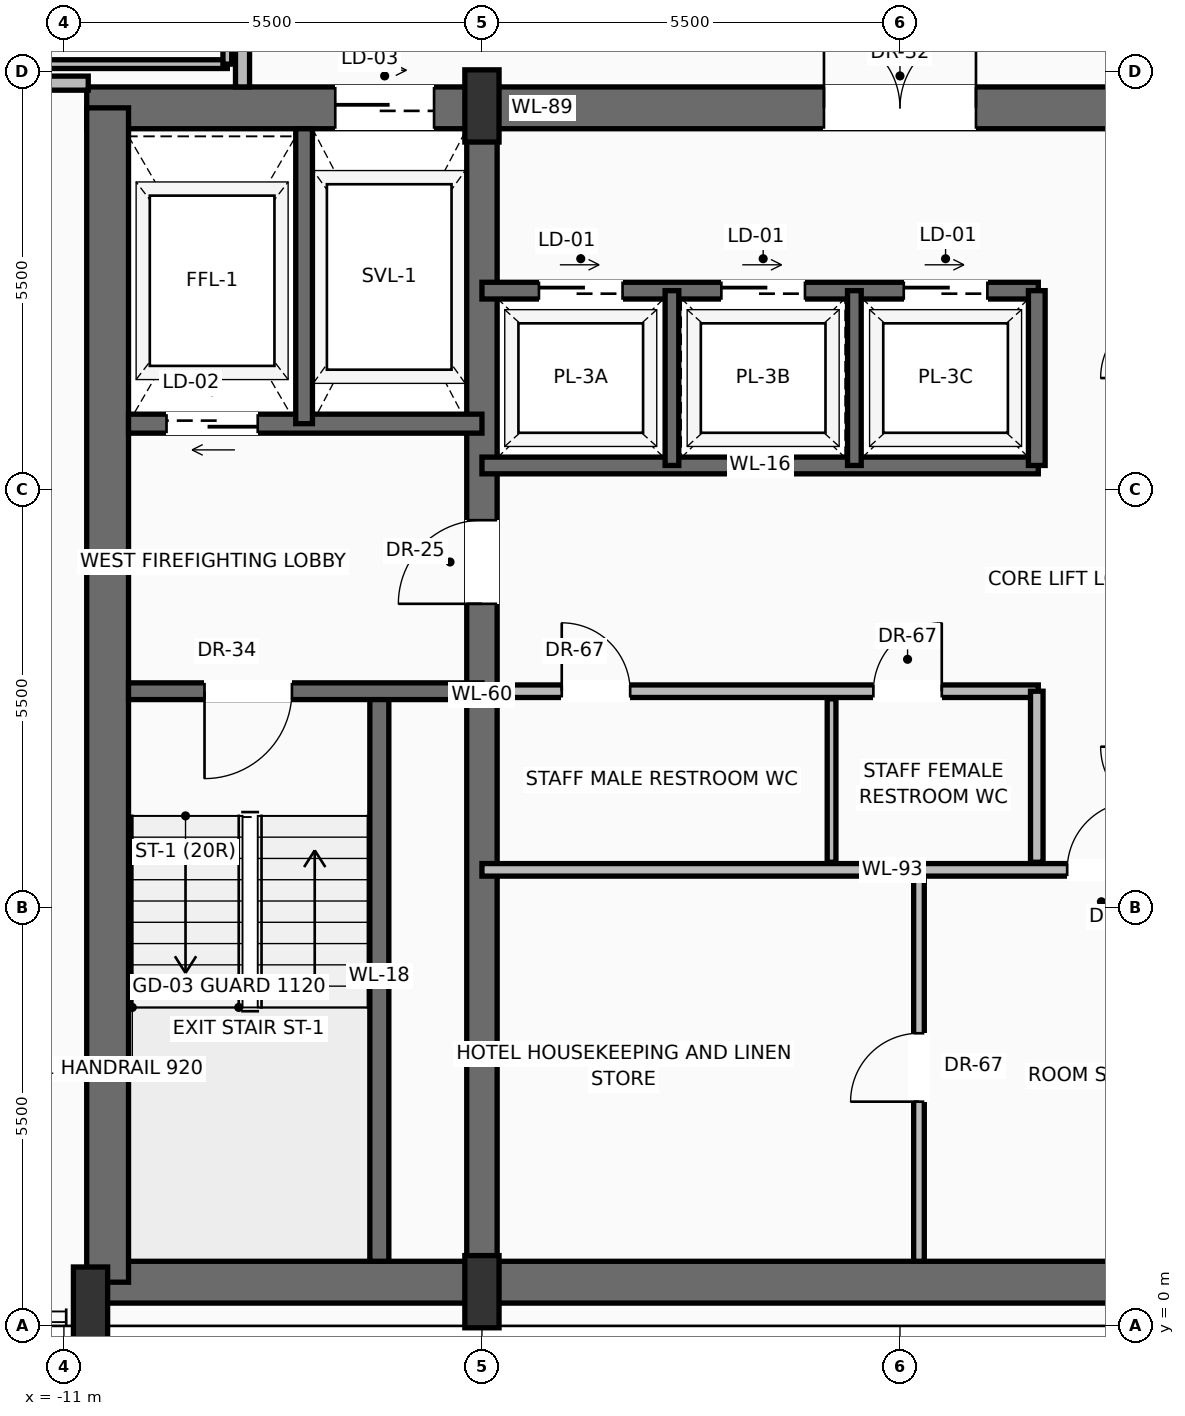
"""IFC4 building model, lengths in metres.
Left out: names, types, materials, properties, quantities, classifications, styles, units other than length and angle.
Written with IfcOpenShell. Run it as: python <this file> out.ifc"""

import sys

from ifc_helpers import new_model, si_unit, direction, frame, frame_2d, origin, origin_2d, place, context, subcontext, project, spatial, rectangle, extrude, source, transform, mapped, element, fill, save


model = new_model("IFC4")
c1 = context("Model", 3, precision=1e-05, world=origin(), true_north=direction((0.0, 1.0)))
c2 = subcontext(c1, "Body", "Model", "MODEL_VIEW")
j1 = project(units=[si_unit("LENGTHUNIT", "METRE"), si_unit("PLANEANGLEUNIT", "RADIAN")], contexts=[c1])
p1 = place(None, origin())
s1 = spatial("IfcSite", under=j1, at=p1, CompositionType="ELEMENT")
p2 = place(p1, origin())
s2 = spatial("IfcBuilding", under=s1, at=p2, CompositionType="ELEMENT")
p3 = place(p2, frame((0.0, 0.0, 230.35)))
s3 = spatial("IfcBuildingStorey", under=s2, at=p3, CompositionType="ELEMENT", Elevation=230.35)
p4 = place(p3, frame((-10.65, 0.575, 0.0), z_axis=(0.0, 0.0, 1.0), x_axis=(1.0, 0.0, 0.0)))
e1 = element("IfcWall", 1, at=p4, inside=s3, PredefinedType="SHEAR", context=c2, shape_type="SweptSolid", body=[
    extrude(rectangle(XDim=21.3, YDim=0.55, at=frame_2d((10.65, 0.0))), origin(), (0.0, 0.0, 1.0), 3.24),
])
p5 = place(p3, frame((-10.7, 16.025, 0.0), z_axis=(0.0, 0.0, 1.0), x_axis=(1.0, 0.0, 0.0)))
e2 = element("IfcWall", 2, at=p5, inside=s3, PredefinedType="SHEAR", context=c2, shape_type="SweptSolid", body=[
    extrude(rectangle(XDim=21.4, YDim=0.55, at=frame_2d((10.7, 0.0))), origin(), (0.0, 0.0, 1.0), 3.24),
])
p6 = place(p5, frame((3.27, 0.0, 0.0)))
e3 = element("IfcOpeningElement", 3, at=p6, cuts=e2, PredefinedType="OPENING", context=c2, shape_type="SweptSolid", body=[
    extrude(rectangle(XDim=1.3, YDim=2.3, at=frame_2d((0.65, 1.15))), frame((0.0, 0.285, 0.0), z_axis=(0.0, -1.0, 0.0), x_axis=(1.0, 0.0, 0.0)), (0.0, 0.0, 1.0), 0.57),
])
p7 = place(p5, frame((9.7, 0.0, 0.0)))
e4 = element("IfcOpeningElement", 4, at=p7, cuts=e2, PredefinedType="OPENING", context=c2, shape_type="SweptSolid", body=[
    extrude(rectangle(XDim=2.0, YDim=2.4, at=frame_2d((1.0, 1.2))), frame((0.0, 0.285, 0.0), z_axis=(0.0, -1.0, 0.0), x_axis=(1.0, 0.0, 0.0)), (0.0, 0.0, 1.0), 0.57),
])
p8 = place(p3, frame((-10.425, 0.575, 0.0), z_axis=(0.0, 0.0, 1.0), x_axis=(0.0, 1.0, 0.0)))
e5 = element("IfcWall", 5, at=p8, inside=s3, PredefinedType="SHEAR", context=c2, shape_type="SweptSolid", body=[
    extrude(rectangle(XDim=15.45, YDim=0.55, at=frame_2d((7.725, 0.0))), origin(), (0.0, 0.0, 1.0), 3.24),
])
p9 = place(p3, frame((-5.5, 0.575, 0.0), z_axis=(0.0, 0.0, 1.0), x_axis=(0.0, 1.0, 0.0)))
e6 = element("IfcWall", 6, at=p9, inside=s3, PredefinedType="SHEAR", context=c2, shape_type="SweptSolid", body=[
    extrude(rectangle(XDim=15.45, YDim=0.4, at=frame_2d((7.725, 0.0))), origin(), (0.0, 0.0, 1.0), 3.24),
])
p10 = place(p9, frame((8.925, 0.0, 0.0)))
e7 = element("IfcOpeningElement", 7, at=p10, cuts=e6, PredefinedType="OPENING", context=c2, shape_type="SweptSolid", body=[
    extrude(rectangle(XDim=1.1, YDim=2.2, at=frame_2d((0.55, 1.1))), frame((0.0, 0.21, 0.0), z_axis=(0.0, -1.0, 0.0), x_axis=(1.0, 0.0, 0.0)), (0.0, 0.0, 1.0), 0.42),
])
m1 = source(origin(), c2, "Body", "SweptSolid", [
    extrude(rectangle(XDim=0.45, YDim=0.95, at=origin_2d()), origin(), (0.0, 0.0, 1.0), 3.45),
])
for number, where, z_axis, x_axis in (
    (8, (-10.65, 0.3, 0.0), (0.0, 0.0, 1.0), (1.0, 0.0, 0.0)),
    (9, (-5.5, 0.45, 0.0), (0.0, 0.0, 1.0), (1.0, 0.0, 0.0)),
    (10, (-5.5, 16.05, 0.0), (0.0, 0.0, 1.0), (1.0, 0.0, 0.0)),
):
    element("IfcColumn", number, at=place(p3, frame(where, z_axis=z_axis, x_axis=x_axis)), inside=s3, PredefinedType="PILASTER", context=c2, shape_type="MappedRepresentation", body=[
        mapped(m1, transform((0.0, 0.0, 0.0), scale=1.0)),
    ])
p11 = place(p3, frame((-19.586, 15.3, 0.0), z_axis=(0.0, 0.0, 1.0), x_axis=(0.510822157644, 0.859686409838, 0.0)))
e11 = element("IfcWall", 11, at=p11, inside=s3, PredefinedType="SOLIDWALL", context=c2, shape_type="SweptSolid", body=[
    extrude(rectangle(XDim=19.464, YDim=0.28, at=frame_2d((9.732, 0.0))), origin(), (0.0, 0.0, 1.0), 2.82),
])
p12 = place(p11, frame((4.671, 0.0, 0.0)))
e12 = element("IfcOpeningElement", 12, at=p12, cuts=e11, PredefinedType="OPENING", context=c2, shape_type="SweptSolid", body=[
    extrude(rectangle(XDim=1.6, YDim=2.35, at=frame_2d((0.8, 1.175))), frame((0.0, 0.15, 0.0), z_axis=(0.0, -1.0, 0.0), x_axis=(1.0, 0.0, 0.0)), (0.0, 0.0, 1.0), 0.3),
])
p13 = place(p11, frame((13.236, 0.0, 0.9)))
e13 = element("IfcOpeningElement", 13, at=p13, cuts=e11, PredefinedType="OPENING", context=c2, shape_type="SweptSolid", body=[
    extrude(rectangle(XDim=1.55, YDim=1.75, at=frame_2d((0.775, 0.875))), frame((0.0, 0.15, 0.0), z_axis=(0.0, -1.0, 0.0), x_axis=(1.0, 0.0, 0.0)), (0.0, 0.0, 1.0), 0.3),
])
p14 = place(p3, frame((-6.85, 0.85, 0.0), z_axis=(0.0, 0.0, 1.0), x_axis=(0.0, 1.0, 0.0)))
e14 = element("IfcWall", 14, at=p14, inside=s3, PredefinedType="SOLIDWALL", context=c2, shape_type="SweptSolid", body=[
    extrude(rectangle(XDim=7.5, YDim=0.25, at=frame_2d((3.75, 0.0))), origin(), (0.0, 0.0, 1.0), 3.24),
])
p15 = place(p3, frame((-5.5, 8.35, 0.0), z_axis=(0.0, 0.0, 1.0), x_axis=(-1.0, 0.0, 0.0)))
e15 = element("IfcWall", 15, at=p15, inside=s3, PredefinedType="SOLIDWALL", context=c2, shape_type="SweptSolid", body=[
    extrude(rectangle(XDim=4.65, YDim=0.22, at=frame_2d((2.325, 0.0))), origin(), (0.0, 0.0, 1.0), 3.24),
])
p16 = place(p15, frame((2.5, 0.0, 0.0)))
e16 = element("IfcOpeningElement", 16, at=p16, cuts=e15, PredefinedType="OPENING", context=c2, shape_type="SweptSolid", body=[
    extrude(rectangle(XDim=1.15, YDim=2.2, at=frame_2d((0.575, 1.1))), frame((0.0, 0.12, 0.0), z_axis=(0.0, -1.0, 0.0), x_axis=(1.0, 0.0, 0.0)), (0.0, 0.0, 1.0), 0.24),
])
p17 = place(p3, frame((-5.5, 11.87, 0.0), z_axis=(0.0, 0.0, 1.0), x_axis=(-1.0, 0.0, 0.0)))
e17 = element("IfcWall", 17, at=p17, inside=s3, PredefinedType="SOLIDWALL", context=c2, shape_type="SweptSolid", body=[
    extrude(rectangle(XDim=4.65, YDim=0.25, at=frame_2d((2.325, 0.0))), origin(), (0.0, 0.0, 1.0), 3.24),
])
p18 = place(p17, frame((2.95, 0.0, 0.0)))
e18 = element("IfcOpeningElement", 18, at=p18, cuts=e17, PredefinedType="OPENING", context=c2, shape_type="SweptSolid", body=[
    extrude(rectangle(XDim=1.2, YDim=2.25, at=frame_2d((0.6, 1.125))), frame((0.0, 0.135, 0.0), z_axis=(0.0, -1.0, 0.0), x_axis=(1.0, 0.0, 0.0)), (0.0, 0.0, 1.0), 0.27),
])
p19 = place(p3, frame((-7.84, 11.87, 0.0), z_axis=(0.0, 0.0, 1.0), x_axis=(0.0, 1.0, 0.0)))
e19 = element("IfcWall", 19, at=p19, inside=s3, PredefinedType="SOLIDWALL", context=c2, shape_type="SweptSolid", body=[
    extrude(rectangle(XDim=3.88, YDim=0.22, at=frame_2d((1.94, 0.0))), origin(), (0.0, 0.0, 1.0), 3.24),
])
p20 = place(p3, frame((-5.5, 6.0, 0.0), z_axis=(0.0, 0.0, 1.0), x_axis=(1.0, 0.0, 0.0)))
e20 = element("IfcWall", 20, at=p20, inside=s3, PredefinedType="PARTITIONING", context=c2, shape_type="SweptSolid", body=[
    extrude(rectangle(XDim=10.8, YDim=0.165, at=frame_2d((5.4, 0.0))), origin(), (0.0, 0.0, 1.0), 3.232),
])
p21 = place(p20, frame((7.7, 0.0, 0.0)))
e21 = element("IfcOpeningElement", 21, at=p21, cuts=e20, PredefinedType="OPENING", context=c2, shape_type="SweptSolid", body=[
    extrude(rectangle(XDim=0.9, YDim=2.1, at=frame_2d((0.45, 1.05))), frame((0.0, 0.093, 0.0), z_axis=(0.0, -1.0, 0.0), x_axis=(1.0, 0.0, 0.0)), (0.0, 0.0, 1.0), 0.185),
])
p22 = place(p3, frame((0.25, 0.85, 0.0), z_axis=(0.0, 0.0, 1.0), x_axis=(0.0, 1.0, 0.0)))
e22 = element("IfcWall", 22, at=p22, inside=s3, PredefinedType="PARTITIONING", context=c2, shape_type="SweptSolid", body=[
    extrude(rectangle(XDim=5.03, YDim=0.14, at=frame_2d((2.515, 0.0))), origin(), (0.0, 0.0, 1.0), 3.232),
])
p23 = place(p22, frame((2.1, 0.0, 0.0)))
e23 = element("IfcOpeningElement", 23, at=p23, cuts=e22, PredefinedType="OPENING", context=c2, shape_type="SweptSolid", body=[
    extrude(rectangle(XDim=0.9, YDim=2.1, at=frame_2d((0.45, 1.05))), frame((0.0, 0.08, 0.0), z_axis=(0.0, -1.0, 0.0), x_axis=(1.0, 0.0, 0.0)), (0.0, 0.0, 1.0), 0.16),
])
p24 = place(p3, frame((-5.3, 8.35, 0.0), z_axis=(0.0, 0.0, 1.0), x_axis=(1.0, 0.0, 0.0)))
e24 = element("IfcWall", 24, at=p24, inside=s3, PredefinedType="PARTITIONING", context=c2, shape_type="SweptSolid", body=[
    extrude(rectangle(XDim=7.12, YDim=0.165, at=frame_2d((3.56, 0.0))), origin(), (0.0, 0.0, 1.0), 3.232),
])
p25 = place(p24, frame((0.85, 0.0, 0.0)))
e25 = element("IfcOpeningElement", 25, at=p25, cuts=e24, PredefinedType="OPENING", context=c2, shape_type="SweptSolid", body=[
    extrude(rectangle(XDim=0.9, YDim=2.1, at=frame_2d((0.45, 1.05))), frame((0.0, 0.093, 0.0), z_axis=(0.0, -1.0, 0.0), x_axis=(1.0, 0.0, 0.0)), (0.0, 0.0, 1.0), 0.185),
])
p26 = place(p24, frame((4.95, 0.0, 0.0)))
e26 = element("IfcOpeningElement", 26, at=p26, cuts=e24, PredefinedType="OPENING", context=c2, shape_type="SweptSolid", body=[
    extrude(rectangle(XDim=0.9, YDim=2.1, at=frame_2d((0.45, 1.05))), frame((0.0, 0.093, 0.0), z_axis=(0.0, -1.0, 0.0), x_axis=(1.0, 0.0, 0.0)), (0.0, 0.0, 1.0), 0.185),
])
p27 = place(p3, frame((1.8, 6.1, 0.0), z_axis=(0.0, 0.0, 1.0), x_axis=(0.0, 1.0, 0.0)))
e27 = element("IfcWall", 27, at=p27, inside=s3, PredefinedType="PARTITIONING", context=c2, shape_type="SweptSolid", body=[
    extrude(rectangle(XDim=2.25, YDim=0.165, at=frame_2d((1.125, 0.0))), origin(), (0.0, 0.0, 1.0), 3.232),
])
p28 = place(p3, frame((-0.9, 6.1, 0.0), z_axis=(0.0, 0.0, 1.0), x_axis=(0.0, 1.0, 0.0)))
e28 = element("IfcWall", 28, at=p28, inside=s3, PredefinedType="PARTITIONING", context=c2, shape_type="SweptSolid", body=[
    extrude(rectangle(XDim=2.15, YDim=0.115, at=frame_2d((1.075, 0.0))), origin(), (0.0, 0.0, 1.0), 3.232),
])
p29 = place(p3, frame((-5.5, 11.32, 0.0), z_axis=(0.0, 0.0, 1.0), x_axis=(1.0, 0.0, 0.0)))
e29 = element("IfcWall", 29, at=p29, inside=s3, PredefinedType="SOLIDWALL", context=c2, shape_type="SweptSolid", body=[
    extrude(rectangle(XDim=7.32, YDim=0.22, at=frame_2d((3.66, 0.0))), origin(), (0.0, 0.0, 1.0), 3.24),
])
p30 = place(p3, frame((-5.5, 13.62, 0.0), z_axis=(0.0, 0.0, 1.0), x_axis=(1.0, 0.0, 0.0)))
e30 = element("IfcWall", 30, at=p30, inside=s3, PredefinedType="SOLIDWALL", context=c2, shape_type="SweptSolid", body=[
    extrude(rectangle(XDim=7.32, YDim=0.22, at=frame_2d((3.66, 0.0))), origin(), (0.0, 0.0, 1.0), 3.24),
])
p31 = place(p30, frame((0.75, 0.0, 0.0)))
e31 = element("IfcOpeningElement", 31, at=p31, cuts=e30, PredefinedType="OPENING", context=c2, shape_type="SweptSolid", body=[
    extrude(rectangle(XDim=1.1, YDim=2.2, at=frame_2d((0.55, 1.1))), frame((0.0, 0.12, 0.0), z_axis=(0.0, -1.0, 0.0), x_axis=(1.0, 0.0, 0.0)), (0.0, 0.0, 1.0), 0.24),
])
p32 = place(p30, frame((3.15, 0.0, 0.0)))
e32 = element("IfcOpeningElement", 32, at=p32, cuts=e30, PredefinedType="OPENING", context=c2, shape_type="SweptSolid", body=[
    extrude(rectangle(XDim=1.1, YDim=2.2, at=frame_2d((0.55, 1.1))), frame((0.0, 0.12, 0.0), z_axis=(0.0, -1.0, 0.0), x_axis=(1.0, 0.0, 0.0)), (0.0, 0.0, 1.0), 0.24),
])
p33 = place(p30, frame((5.55, 0.0, 0.0)))
e33 = element("IfcOpeningElement", 33, at=p33, cuts=e30, PredefinedType="OPENING", context=c2, shape_type="SweptSolid", body=[
    extrude(rectangle(XDim=1.1, YDim=2.2, at=frame_2d((0.55, 1.1))), frame((0.0, 0.12, 0.0), z_axis=(0.0, -1.0, 0.0), x_axis=(1.0, 0.0, 0.0)), (0.0, 0.0, 1.0), 0.24),
])
p34 = place(p3, frame((1.8, 11.32, 0.0), z_axis=(0.0, 0.0, 1.0), x_axis=(0.0, 1.0, 0.0)))
e34 = element("IfcWall", 34, at=p34, inside=s3, PredefinedType="SOLIDWALL", context=c2, shape_type="SweptSolid", body=[
    extrude(rectangle(XDim=2.3, YDim=0.22, at=frame_2d((1.15, 0.0))), origin(), (0.0, 0.0, 1.0), 3.24),
])
for number, where, z_axis, x_axis in (
    (35, (-3.0, 11.32, 0.0), (0.0, 0.0, 1.0), (0.0, 1.0, 0.0)),
    (36, (-0.6, 11.32, 0.0), (0.0, 0.0, 1.0), (0.0, 1.0, 0.0)),
):
    element("IfcWall", number, at=place(p3, frame(where, z_axis=z_axis, x_axis=x_axis)), inside=s3, PredefinedType="SOLIDWALL", context=c2, shape_type="SweptSolid", body=[
        extrude(rectangle(XDim=2.3, YDim=0.18, at=frame_2d((1.15, 0.0))), origin(), (0.0, 0.0, 1.0), 3.24),
    ])
p35 = place(p3, frame((-8.65, 16.3, 0.0), z_axis=(0.0, 0.0, 1.0), x_axis=(0.0, 1.0, 0.0)))
e37 = element("IfcWall", 37, at=p35, inside=s3, PredefinedType="PARTITIONING", context=c2, shape_type="SweptSolid", body=[
    extrude(rectangle(XDim=10.5, YDim=0.185, at=frame_2d((5.25, 0.0))), origin(), (0.0, 0.0, 1.0), 3.232),
])
p36 = place(p35, frame((2.854, 0.0, 0.0)))
e38 = element("IfcOpeningElement", 38, at=p36, cuts=e37, PredefinedType="OPENING", context=c2, shape_type="SweptSolid", body=[
    extrude(rectangle(XDim=1.05, YDim=2.25, at=frame_2d((0.525, 1.125))), frame((0.0, 0.103, 0.0), z_axis=(0.0, -1.0, 0.0), x_axis=(1.0, 0.0, 0.0)), (0.0, 0.0, 1.0), 0.205),
])
p37 = place(p35, frame((5.752, 0.0, 0.0)))
e39 = element("IfcOpeningElement", 39, at=p37, cuts=e37, PredefinedType="OPENING", context=c2, shape_type="SweptSolid", body=[
    extrude(rectangle(XDim=1.05, YDim=2.25, at=frame_2d((0.525, 1.125))), frame((0.0, 0.103, 0.0), z_axis=(0.0, -1.0, 0.0), x_axis=(1.0, 0.0, 0.0)), (0.0, 0.0, 1.0), 0.205),
])
p38 = place(p35, frame((8.457, 0.0, 0.0)))
e40 = element("IfcOpeningElement", 40, at=p38, cuts=e37, PredefinedType="OPENING", context=c2, shape_type="SweptSolid", body=[
    extrude(rectangle(XDim=1.05, YDim=2.25, at=frame_2d((0.525, 1.125))), frame((0.0, 0.103, 0.0), z_axis=(0.0, -1.0, 0.0), x_axis=(1.0, 0.0, 0.0)), (0.0, 0.0, 1.0), 0.205),
])
p39 = place(p3, frame((-19.114, 16.35, 0.0), z_axis=(0.0, 0.0, 1.0), x_axis=(1.0, 0.0, 0.0)))
e41 = element("IfcWall", 41, at=p39, inside=s3, PredefinedType="PARTITIONING", context=c2, shape_type="SweptSolid", body=[
    extrude(rectangle(XDim=8.434, YDim=0.185, at=frame_2d((4.217, 0.0))), origin(), (0.0, 0.0, 1.0), 3.232),
])
p40 = place(p39, frame((4.855, 0.0, 0.0)))
e42 = element("IfcOpeningElement", 42, at=p40, cuts=e41, PredefinedType="OPENING", context=c2, shape_type="SweptSolid", body=[
    extrude(rectangle(XDim=1.05, YDim=2.25, at=frame_2d((0.525, 1.125))), frame((0.0, 0.103, 0.0), z_axis=(0.0, -1.0, 0.0), x_axis=(1.0, 0.0, 0.0)), (0.0, 0.0, 1.0), 0.205),
])
p41 = place(p3, frame((-11.5, 16.6, 0.0), z_axis=(0.0, 0.0, 1.0), x_axis=(1.0, 0.0, 0.0)))
e43 = element("IfcWall", 43, at=p41, inside=s3, PredefinedType="PARTITIONING", context=c2, shape_type="SweptSolid", body=[
    extrude(rectangle(XDim=2.65, YDim=0.115, at=frame_2d((1.325, 0.0))), origin(), (0.0, 0.0, 1.0), 3.232),
])
p42 = place(p3, frame((-8.85, 16.6, 0.0), z_axis=(0.0, 0.0, 1.0), x_axis=(0.0, 1.0, 0.0)))
e44 = element("IfcWall", 44, at=p42, inside=s3, PredefinedType="PARTITIONING", context=c2, shape_type="SweptSolid", body=[
    extrude(rectangle(XDim=2.4, YDim=0.115, at=frame_2d((1.2, 0.0))), origin(), (0.0, 0.0, 1.0), 3.232),
])
m2 = source(origin(), c2, "Body", "SweptSolid", [
    extrude(rectangle(XDim=1.15, YDim=2.2, at=frame_2d((0.575, 1.1))), frame((0.0, 0.025, 0.0), z_axis=(0.0, -1.0, 0.0), x_axis=(1.0, 0.0, 0.0)), (0.0, 0.0, 1.0), 0.05),
])
p43 = place(p16, origin())
e45 = element("IfcDoor", 45, at=p43, inside=s3, OperationType="SINGLE_SWING_RIGHT", PredefinedType="DOOR", context=c2, shape_type="MappedRepresentation", body=[
    mapped(m2, transform((0.0, 0.0, 0.0), scale=1.0)),
])
fill(e16, e45)
m3 = source(origin(), c2, "Body", "SweptSolid", [
    extrude(rectangle(XDim=1.1, YDim=2.2, at=frame_2d((0.55, 1.1))), frame((0.0, 0.025, 0.0), z_axis=(0.0, -1.0, 0.0), x_axis=(1.0, 0.0, 0.0)), (0.0, 0.0, 1.0), 0.05),
])
p44 = place(p10, origin())
e46 = element("IfcDoor", 46, at=p44, inside=s3, OperationType="SINGLE_SWING_LEFT", PredefinedType="DOOR", context=c2, shape_type="MappedRepresentation", body=[
    mapped(m3, transform((0.0, 0.0, 0.0), scale=1.0)),
])
fill(e7, e46)
m4 = source(origin(), c2, "Body", "SweptSolid", [
    extrude(rectangle(XDim=1.2, YDim=2.25, at=frame_2d((0.6, 1.125))), frame((0.0, 0.025, 0.0), z_axis=(0.0, -1.0, 0.0), x_axis=(1.0, 0.0, 0.0)), (0.0, 0.0, 1.0), 0.05),
])
p45 = place(p18, origin())
e47 = element("IfcDoor", 47, at=p45, inside=s3, OperationType="SLIDING_TO_LEFT", PredefinedType="DOOR", context=c2, shape_type="MappedRepresentation", body=[
    mapped(m4, transform((0.0, 0.0, 0.0), scale=1.0)),
])
fill(e18, e47)
m5 = source(origin(), c2, "Body", "SweptSolid", [
    extrude(rectangle(XDim=1.3, YDim=2.3, at=frame_2d((0.65, 1.15))), frame((0.0, 0.025, 0.0), z_axis=(0.0, -1.0, 0.0), x_axis=(1.0, 0.0, 0.0)), (0.0, 0.0, 1.0), 0.05),
])
p46 = place(p6, origin())
e48 = element("IfcDoor", 48, at=p46, inside=s3, OperationType="SLIDING_TO_RIGHT", PredefinedType="DOOR", context=c2, shape_type="MappedRepresentation", body=[
    mapped(m5, transform((0.0, 0.0, 0.0), scale=1.0)),
])
fill(e3, e48)
m6 = source(origin(), c2, "Body", "SweptSolid", [
    extrude(rectangle(XDim=2.0, YDim=2.4, at=frame_2d((1.0, 1.2))), frame((0.0, 0.025, 0.0), z_axis=(0.0, -1.0, 0.0), x_axis=(1.0, 0.0, 0.0)), (0.0, 0.0, 1.0), 0.05),
])
p47 = place(p7, origin())
e49 = element("IfcDoor", 49, at=p47, inside=s3, OperationType="DOUBLE_DOOR_SINGLE_SWING", PredefinedType="DOOR", context=c2, shape_type="MappedRepresentation", body=[
    mapped(m6, transform((0.0, 0.0, 0.0), scale=1.0)),
])
fill(e4, e49)
m7 = source(origin(), c2, "Body", "SweptSolid", [
    extrude(rectangle(XDim=0.9, YDim=2.1, at=frame_2d((0.45, 1.05))), frame((0.0, 0.025, 0.0), z_axis=(0.0, -1.0, 0.0), x_axis=(1.0, 0.0, 0.0)), (0.0, 0.0, 1.0), 0.05),
])
p48 = place(p21, origin())
e50 = element("IfcDoor", 50, at=p48, inside=s3, OperationType="SINGLE_SWING_RIGHT", PredefinedType="DOOR", context=c2, shape_type="MappedRepresentation", body=[
    mapped(m7, transform((0.0, 0.0, 0.0), scale=1.0)),
])
fill(e21, e50)
p49 = place(p23, origin())
e51 = element("IfcDoor", 51, at=p49, inside=s3, OperationType="SINGLE_SWING_LEFT", PredefinedType="DOOR", context=c2, shape_type="MappedRepresentation", body=[
    mapped(m7, transform((0.0, 0.0, 0.0), scale=1.0)),
])
fill(e23, e51)
p50 = place(p25, origin())
e52 = element("IfcDoor", 52, at=p50, inside=s3, OperationType="SINGLE_SWING_LEFT", PredefinedType="DOOR", context=c2, shape_type="MappedRepresentation", body=[
    mapped(m7, transform((0.0, 0.0, 0.0), scale=1.0)),
])
fill(e25, e52)
p51 = place(p26, origin())
e53 = element("IfcDoor", 53, at=p51, inside=s3, OperationType="SINGLE_SWING_RIGHT", PredefinedType="DOOR", context=c2, shape_type="MappedRepresentation", body=[
    mapped(m7, transform((0.0, 0.0, 0.0), scale=1.0)),
])
fill(e26, e53)
m8 = source(origin(), c2, "Body", "SweptSolid", [
    extrude(rectangle(XDim=1.1, YDim=2.2, at=frame_2d((0.55, 1.1))), frame((0.0, 0.025, 0.0), z_axis=(0.0, -1.0, 0.0), x_axis=(1.0, 0.0, 0.0)), (0.0, 0.0, 1.0), 0.05),
])
p52 = place(p31, origin())
e54 = element("IfcDoor", 54, at=p52, inside=s3, OperationType="SLIDING_TO_RIGHT", PredefinedType="DOOR", context=c2, shape_type="MappedRepresentation", body=[
    mapped(m8, transform((0.0, 0.0, 0.0), scale=1.0)),
])
fill(e31, e54)
p53 = place(p32, origin())
e55 = element("IfcDoor", 55, at=p53, inside=s3, OperationType="SLIDING_TO_RIGHT", PredefinedType="DOOR", context=c2, shape_type="MappedRepresentation", body=[
    mapped(m8, transform((0.0, 0.0, 0.0), scale=1.0)),
])
fill(e32, e55)
p54 = place(p33, origin())
e56 = element("IfcDoor", 56, at=p54, inside=s3, OperationType="SLIDING_TO_RIGHT", PredefinedType="DOOR", context=c2, shape_type="MappedRepresentation", body=[
    mapped(m8, transform((0.0, 0.0, 0.0), scale=1.0)),
])
fill(e33, e56)
save(model, sys.argv[1])
